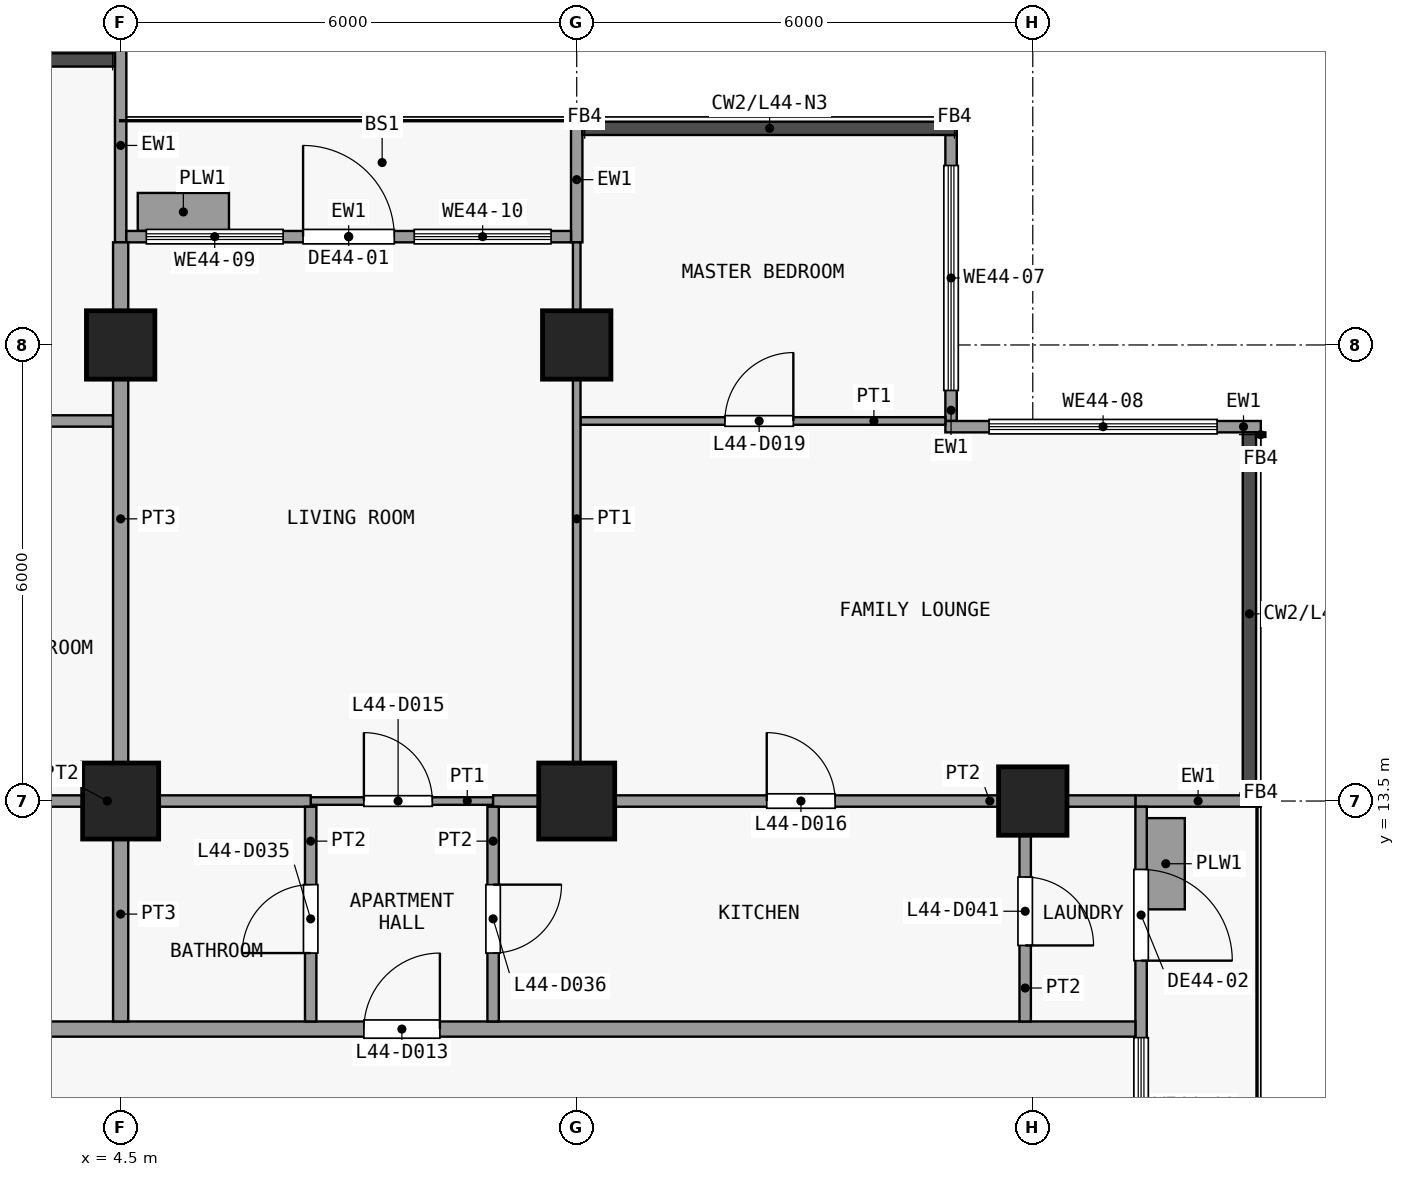
"""IFC4 building model, lengths in metres.
Left out: names, types, materials, properties, quantities, classifications, styles, units other than length and angle.
Written with IfcOpenShell. Run it as: python <this file> out.ifc"""

import sys

from ifc_helpers import new_model, si_unit, direction, frame, frame_2d, origin, origin_2d, place, context, subcontext, project, spatial, rectangle, extrude, element, fill, save


model = new_model("IFC4")
c1 = context("Model", 3, precision=1e-05, world=origin(), true_north=direction((0.0, 1.0)))
c2 = subcontext(c1, "Body", "Model", "MODEL_VIEW")
j1 = project(units=[si_unit("LENGTHUNIT", "METRE"), si_unit("PLANEANGLEUNIT", "RADIAN")], contexts=[c1])
p1 = place(None, origin())
s1 = spatial("IfcSite", under=j1, at=p1, CompositionType="ELEMENT")
p2 = place(p1, origin())
s2 = spatial("IfcBuilding", under=s1, at=p2, CompositionType="ELEMENT")
p3 = place(p2, frame((0.0, 0.0, 178.1)))
s3 = spatial("IfcBuildingStorey", under=s2, at=p3, CompositionType="ELEMENT", Elevation=178.1)
p4 = place(p3, frame((4.5, 13.5, 0.0), z_axis=(0.0, 0.0, 1.0), x_axis=(1.0, 0.0, 0.0)))
e1 = element("IfcColumn", 1, at=p4, inside=s3, PredefinedType="COLUMN", context=c2, shape_type="SweptSolid", body=[
    extrude(rectangle(XDim=1.0, YDim=1.0, at=origin_2d()), origin(), (0.0, 0.0, 1.0), 3.6),
])
p5 = place(p3, frame((4.5, 19.5, 0.0), z_axis=(0.0, 0.0, 1.0), x_axis=(1.0, 0.0, 0.0)))
e2 = element("IfcColumn", 2, at=p5, inside=s3, PredefinedType="COLUMN", context=c2, shape_type="SweptSolid", body=[
    extrude(rectangle(XDim=0.9, YDim=0.9, at=origin_2d()), origin(), (0.0, 0.0, 1.0), 3.6),
])
p6 = place(p3, frame((10.5, 13.5, 0.0), z_axis=(0.0, 0.0, 1.0), x_axis=(1.0, 0.0, 0.0)))
e3 = element("IfcColumn", 3, at=p6, inside=s3, PredefinedType="COLUMN", context=c2, shape_type="SweptSolid", body=[
    extrude(rectangle(XDim=1.0, YDim=1.0, at=origin_2d()), origin(), (0.0, 0.0, 1.0), 3.6),
])
for number, where, z_axis, x_axis in (
    (4, (10.5, 19.5, 0.0), (0.0, 0.0, 1.0), (1.0, 0.0, 0.0)),
    (5, (16.5, 13.5, 0.0), (0.0, 0.0, 1.0), (1.0, 0.0, 0.0)),
):
    element("IfcColumn", number, at=place(p3, frame(where, z_axis=z_axis, x_axis=x_axis)), inside=s3, PredefinedType="COLUMN", context=c2, shape_type="SweptSolid", body=[
        extrude(rectangle(XDim=0.9, YDim=0.9, at=origin_2d()), origin(), (0.0, 0.0, 1.0), 3.6),
    ])
p7 = place(p3, frame((15.425, 22.262, 0.0), z_axis=(0.0, 0.0, 1.0), x_axis=(0.0, -1.0, 0.0)))
e6 = element("IfcWall", 6, at=p7, inside=s3, PredefinedType="SOLIDWALL", context=c2, shape_type="SweptSolid", body=[
    extrude(rectangle(XDim=3.762, YDim=0.15, at=frame_2d((1.881, 0.0))), origin(), (0.0, 0.0, 1.0), 3.3),
])
p8 = place(p7, frame((0.401, 0.0, 0.9)))
e7 = element("IfcOpeningElement", 7, at=p8, cuts=e6, PredefinedType="OPENING", context=c2, shape_type="SweptSolid", body=[
    extrude(rectangle(XDim=2.96, YDim=2.4, at=frame_2d((1.48, 1.2))), frame((0.0, 0.085, 0.0), z_axis=(0.0, -1.0, 0.0), x_axis=(1.0, 0.0, 0.0)), (0.0, 0.0, 1.0), 0.17),
])
p9 = place(p3, frame((15.35, 18.425, 0.0), z_axis=(0.0, 0.0, 1.0), x_axis=(1.0, 0.0, 0.0)))
e8 = element("IfcWall", 8, at=p9, inside=s3, PredefinedType="SOLIDWALL", context=c2, shape_type="SweptSolid", body=[
    extrude(rectangle(XDim=4.15, YDim=0.15, at=frame_2d((2.075, 0.0))), origin(), (0.0, 0.0, 1.0), 3.3),
])
p10 = place(p9, frame((0.575, 0.0, 0.9)))
e9 = element("IfcOpeningElement", 9, at=p10, cuts=e8, PredefinedType="OPENING", context=c2, shape_type="SweptSolid", body=[
    extrude(rectangle(XDim=3.0, YDim=2.4, at=frame_2d((1.5, 1.2))), frame((0.0, 0.085, 0.0), z_axis=(0.0, -1.0, 0.0), x_axis=(1.0, 0.0, 0.0)), (0.0, 0.0, 1.0), 0.17),
])
p11 = place(p3, frame((4.5, 20.85, 0.0), z_axis=(0.0, 0.0, 1.0), x_axis=(0.0, 1.0, 0.0)))
e10 = element("IfcWall", 10, at=p11, inside=s3, PredefinedType="SOLIDWALL", context=c2, shape_type="SweptSolid", body=[
    extrude(rectangle(XDim=2.55, YDim=0.15, at=frame_2d((1.275, 0.0))), origin(), (0.0, 0.0, 1.0), 3.3),
])
p12 = place(p3, frame((10.5, 20.85, 0.0), z_axis=(0.0, 0.0, 1.0), x_axis=(0.0, 1.0, 0.0)))
e11 = element("IfcWall", 11, at=p12, inside=s3, PredefinedType="SOLIDWALL", context=c2, shape_type="SweptSolid", body=[
    extrude(rectangle(XDim=1.65, YDim=0.15, at=frame_2d((0.825, 0.0))), origin(), (0.0, 0.0, 1.0), 3.3),
])
p13 = place(p3, frame((4.575, 20.925, 0.0), z_axis=(0.0, 0.0, 1.0), x_axis=(1.0, 0.0, 0.0)))
e12 = element("IfcWall", 12, at=p13, inside=s3, PredefinedType="SOLIDWALL", context=c2, shape_type="SweptSolid", body=[
    extrude(rectangle(XDim=5.85, YDim=0.15, at=frame_2d((2.925, 0.0))), origin(), (0.0, 0.0, 1.0), 3.3),
])
p14 = place(p13, frame((2.325, 0.0, 0.0)))
e13 = element("IfcOpeningElement", 13, at=p14, cuts=e12, PredefinedType="OPENING", context=c2, shape_type="SweptSolid", body=[
    extrude(rectangle(XDim=1.2, YDim=2.4, at=frame_2d((0.6, 1.2))), frame((0.0, 0.085, 0.0), z_axis=(0.0, -1.0, 0.0), x_axis=(1.0, 0.0, 0.0)), (0.0, 0.0, 1.0), 0.17),
])
p15 = place(p13, frame((0.262, 0.0, 0.9)))
e14 = element("IfcOpeningElement", 14, at=p15, cuts=e12, PredefinedType="OPENING", context=c2, shape_type="SweptSolid", body=[
    extrude(rectangle(XDim=1.8, YDim=2.1, at=frame_2d((0.9, 1.05))), frame((0.0, 0.085, 0.0), z_axis=(0.0, -1.0, 0.0), x_axis=(1.0, 0.0, 0.0)), (0.0, 0.0, 1.0), 0.17),
])
p16 = place(p13, frame((3.788, 0.0, 0.9)))
e15 = element("IfcOpeningElement", 15, at=p16, cuts=e12, PredefinedType="OPENING", context=c2, shape_type="SweptSolid", body=[
    extrude(rectangle(XDim=1.8, YDim=2.1, at=frame_2d((0.9, 1.05))), frame((0.0, 0.085, 0.0), z_axis=(0.0, -1.0, 0.0), x_axis=(1.0, 0.0, 0.0)), (0.0, 0.0, 1.0), 0.17),
])
p17 = place(p3, frame((4.725, 21.25, 0.0), z_axis=(0.0, 0.0, 1.0), x_axis=(1.0, 0.0, 0.0)))
e16 = element("IfcWall", 16, at=p17, inside=s3, PredefinedType="USERDEFINED", context=c2, shape_type="SweptSolid", body=[
    extrude(rectangle(XDim=1.2, YDim=0.5, at=frame_2d((0.6, 0.0))), origin(), (0.0, 0.0, 1.0), 0.9),
])
p18 = place(p3, frame((17.85, 13.5, 0.0), z_axis=(0.0, 0.0, 1.0), x_axis=(1.0, 0.0, 0.0)))
e17 = element("IfcWall", 17, at=p18, inside=s3, PredefinedType="SOLIDWALL", context=c2, shape_type="SweptSolid", body=[
    extrude(rectangle(XDim=1.65, YDim=0.15, at=frame_2d((0.825, 0.0))), origin(), (0.0, 0.0, 1.0), 3.3),
])
p19 = place(p3, frame((17.925, 13.425, 0.0), z_axis=(0.0, 0.0, 1.0), x_axis=(0.0, -1.0, 0.0)))
e18 = element("IfcWall", 18, at=p19, inside=s3, PredefinedType="SOLIDWALL", context=c2, shape_type="SweptSolid", body=[
    extrude(rectangle(XDim=5.85, YDim=0.15, at=frame_2d((2.925, 0.0))), origin(), (0.0, 0.0, 1.0), 3.3),
])
p20 = place(p19, frame((0.825, 0.0, 0.0)))
e19 = element("IfcOpeningElement", 19, at=p20, cuts=e18, PredefinedType="OPENING", context=c2, shape_type="SweptSolid", body=[
    extrude(rectangle(XDim=1.2, YDim=2.4, at=frame_2d((0.6, 1.2))), frame((0.0, 0.085, 0.0), z_axis=(0.0, -1.0, 0.0), x_axis=(1.0, 0.0, 0.0)), (0.0, 0.0, 1.0), 0.17),
])
p21 = place(p19, frame((3.038, 0.0, 0.9)))
e20 = element("IfcOpeningElement", 20, at=p21, cuts=e18, PredefinedType="OPENING", context=c2, shape_type="SweptSolid", body=[
    extrude(rectangle(XDim=1.8, YDim=2.1, at=frame_2d((0.9, 1.05))), frame((0.0, 0.085, 0.0), z_axis=(0.0, -1.0, 0.0), x_axis=(1.0, 0.0, 0.0)), (0.0, 0.0, 1.0), 0.17),
])
p22 = place(p3, frame((18.25, 12.075, 0.0), z_axis=(0.0, 0.0, 1.0), x_axis=(0.0, 1.0, 0.0)))
e21 = element("IfcWall", 21, at=p22, inside=s3, PredefinedType="USERDEFINED", context=c2, shape_type="SweptSolid", body=[
    extrude(rectangle(XDim=1.2, YDim=0.5, at=frame_2d((0.6, 0.0))), origin(), (0.0, 0.0, 1.0), 0.9),
])
p23 = place(p3, frame((-19.35, 10.5, 0.0), z_axis=(0.0, 0.0, 1.0), x_axis=(1.0, 0.0, 0.0)))
e22 = element("IfcWall", 22, at=p23, inside=s3, PredefinedType="PARTITIONING", context=c2, shape_type="SweptSolid", body=[
    extrude(rectangle(XDim=37.2, YDim=0.2, at=frame_2d((18.6, 0.0))), origin(), (0.0, 0.0, 1.0), 3.3),
])
p24 = place(p23, frame((13.05, 0.0, 0.0)))
e23 = element("IfcOpeningElement", 23, at=p24, cuts=e22, PredefinedType="OPENING", context=c2, shape_type="SweptSolid", body=[
    extrude(rectangle(XDim=1.0, YDim=2.1, at=frame_2d((0.5, 1.05))), frame((0.0, 0.11, 0.0), z_axis=(0.0, -1.0, 0.0), x_axis=(1.0, 0.0, 0.0)), (0.0, 0.0, 1.0), 0.22),
])
p25 = place(p23, frame((27.05, 0.0, 0.0)))
e24 = element("IfcOpeningElement", 24, at=p25, cuts=e22, PredefinedType="OPENING", context=c2, shape_type="SweptSolid", body=[
    extrude(rectangle(XDim=1.0, YDim=2.1, at=frame_2d((0.5, 1.05))), frame((0.0, 0.11, 0.0), z_axis=(0.0, -1.0, 0.0), x_axis=(1.0, 0.0, 0.0)), (0.0, 0.0, 1.0), 0.22),
])
p26 = place(p3, frame((7.0, 13.5, 0.0), z_axis=(0.0, 0.0, 1.0), x_axis=(1.0, 0.0, 0.0)))
e25 = element("IfcWall", 25, at=p26, inside=s3, PredefinedType="PARTITIONING", context=c2, shape_type="SweptSolid", body=[
    extrude(rectangle(XDim=2.4, YDim=0.1, at=frame_2d((1.2, 0.0))), origin(), (0.0, 0.0, 1.0), 3.3),
])
p27 = place(p26, frame((0.7, 0.0, 0.0)))
e26 = element("IfcOpeningElement", 26, at=p27, cuts=e25, PredefinedType="OPENING", context=c2, shape_type="SweptSolid", body=[
    extrude(rectangle(XDim=0.9, YDim=2.1, at=frame_2d((0.45, 1.05))), frame((0.0, 0.06, 0.0), z_axis=(0.0, -1.0, 0.0), x_axis=(1.0, 0.0, 0.0)), (0.0, 0.0, 1.0), 0.12),
])
p28 = place(p3, frame((1.65, 13.5, 0.0), z_axis=(0.0, 0.0, 1.0), x_axis=(1.0, 0.0, 0.0)))
e27 = element("IfcWall", 27, at=p28, inside=s3, PredefinedType="PARTITIONING", context=c2, shape_type="SweptSolid", body=[
    extrude(rectangle(XDim=5.35, YDim=0.15, at=frame_2d((2.675, 0.0))), origin(), (0.0, 0.0, 1.0), 3.3),
])
p29 = place(p3, frame((9.4, 13.5, 0.0), z_axis=(0.0, 0.0, 1.0), x_axis=(1.0, 0.0, 0.0)))
e28 = element("IfcWall", 28, at=p29, inside=s3, PredefinedType="PARTITIONING", context=c2, shape_type="SweptSolid", body=[
    extrude(rectangle(XDim=8.45, YDim=0.15, at=frame_2d((4.225, 0.0))), origin(), (0.0, 0.0, 1.0), 3.3),
])
p30 = place(p29, frame((3.6, 0.0, 0.0)))
e29 = element("IfcOpeningElement", 29, at=p30, cuts=e28, PredefinedType="OPENING", context=c2, shape_type="SweptSolid", body=[
    extrude(rectangle(XDim=0.9, YDim=2.1, at=frame_2d((0.45, 1.05))), frame((0.0, 0.085, 0.0), z_axis=(0.0, -1.0, 0.0), x_axis=(1.0, 0.0, 0.0)), (0.0, 0.0, 1.0), 0.17),
])
p31 = place(p3, frame((10.55, 18.5, 0.0), z_axis=(0.0, 0.0, 1.0), x_axis=(1.0, 0.0, 0.0)))
e30 = element("IfcWall", 30, at=p31, inside=s3, PredefinedType="PARTITIONING", context=c2, shape_type="SweptSolid", body=[
    extrude(rectangle(XDim=4.8, YDim=0.1, at=frame_2d((2.4, 0.0))), origin(), (0.0, 0.0, 1.0), 3.3),
])
p32 = place(p31, frame((1.9, 0.0, 0.0)))
e31 = element("IfcOpeningElement", 31, at=p32, cuts=e30, PredefinedType="OPENING", context=c2, shape_type="SweptSolid", body=[
    extrude(rectangle(XDim=0.9, YDim=2.1, at=frame_2d((0.45, 1.05))), frame((0.0, 0.06, 0.0), z_axis=(0.0, -1.0, 0.0), x_axis=(1.0, 0.0, 0.0)), (0.0, 0.0, 1.0), 0.12),
])
p33 = place(p3, frame((1.2, 18.5, 0.0), z_axis=(0.0, 0.0, 1.0), x_axis=(1.0, 0.0, 0.0)))
e32 = element("IfcWall", 32, at=p33, inside=s3, PredefinedType="PARTITIONING", context=c2, shape_type="SweptSolid", body=[
    extrude(rectangle(XDim=3.2, YDim=0.15, at=frame_2d((1.6, 0.0))), origin(), (0.0, 0.0, 1.0), 3.3),
])
p34 = place(p33, frame((1.2, 0.0, 0.0)))
e33 = element("IfcOpeningElement", 33, at=p34, cuts=e32, PredefinedType="OPENING", context=c2, shape_type="SweptSolid", body=[
    extrude(rectangle(XDim=0.9, YDim=2.1, at=frame_2d((0.45, 1.05))), frame((0.0, 0.085, 0.0), z_axis=(0.0, -1.0, 0.0), x_axis=(1.0, 0.0, 0.0)), (0.0, 0.0, 1.0), 0.17),
])
p35 = place(p3, frame((4.5, 10.6, 0.0), z_axis=(0.0, 0.0, 1.0), x_axis=(0.0, 1.0, 0.0)))
e34 = element("IfcWall", 34, at=p35, inside=s3, PredefinedType="PARTITIONING", context=c2, shape_type="SweptSolid", body=[
    extrude(rectangle(XDim=2.825, YDim=0.2, at=frame_2d((1.413, 0.0))), origin(), (0.0, 0.0, 1.0), 3.3),
])
p36 = place(p3, frame((4.5, 13.575, 0.0), z_axis=(0.0, 0.0, 1.0), x_axis=(0.0, 1.0, 0.0)))
e35 = element("IfcWall", 35, at=p36, inside=s3, PredefinedType="PARTITIONING", context=c2, shape_type="SweptSolid", body=[
    extrude(rectangle(XDim=7.275, YDim=0.2, at=frame_2d((3.638, 0.0))), origin(), (0.0, 0.0, 1.0), 3.3),
])
p37 = place(p3, frame((7.0, 10.6, 0.0), z_axis=(0.0, 0.0, 1.0), x_axis=(0.0, 1.0, 0.0)))
e36 = element("IfcWall", 36, at=p37, inside=s3, PredefinedType="PARTITIONING", context=c2, shape_type="SweptSolid", body=[
    extrude(rectangle(XDim=2.825, YDim=0.15, at=frame_2d((1.413, 0.0))), origin(), (0.0, 0.0, 1.0), 3.3),
])
p38 = place(p37, frame((0.9, 0.0, 0.0)))
e37 = element("IfcOpeningElement", 37, at=p38, cuts=e36, PredefinedType="OPENING", context=c2, shape_type="SweptSolid", body=[
    extrude(rectangle(XDim=0.9, YDim=2.1, at=frame_2d((0.45, 1.05))), frame((0.0, 0.085, 0.0), z_axis=(0.0, -1.0, 0.0), x_axis=(1.0, 0.0, 0.0)), (0.0, 0.0, 1.0), 0.17),
])
p39 = place(p3, frame((9.4, 10.6, 0.0), z_axis=(0.0, 0.0, 1.0), x_axis=(0.0, 1.0, 0.0)))
e38 = element("IfcWall", 38, at=p39, inside=s3, PredefinedType="PARTITIONING", context=c2, shape_type="SweptSolid", body=[
    extrude(rectangle(XDim=2.825, YDim=0.15, at=frame_2d((1.413, 0.0))), origin(), (0.0, 0.0, 1.0), 3.3),
])
p40 = place(p39, frame((0.9, 0.0, 0.0)))
e39 = element("IfcOpeningElement", 39, at=p40, cuts=e38, PredefinedType="OPENING", context=c2, shape_type="SweptSolid", body=[
    extrude(rectangle(XDim=0.9, YDim=2.1, at=frame_2d((0.45, 1.05))), frame((0.0, 0.085, 0.0), z_axis=(0.0, -1.0, 0.0), x_axis=(1.0, 0.0, 0.0)), (0.0, 0.0, 1.0), 0.17),
])
p41 = place(p3, frame((10.5, 13.575, 0.0), z_axis=(0.0, 0.0, 1.0), x_axis=(0.0, 1.0, 0.0)))
e40 = element("IfcWall", 40, at=p41, inside=s3, PredefinedType="PARTITIONING", context=c2, shape_type="SweptSolid", body=[
    extrude(rectangle(XDim=7.275, YDim=0.1, at=frame_2d((3.638, 0.0))), origin(), (0.0, 0.0, 1.0), 3.3),
])
p42 = place(p3, frame((16.4, 10.6, 0.0), z_axis=(0.0, 0.0, 1.0), x_axis=(0.0, 1.0, 0.0)))
e41 = element("IfcWall", 41, at=p42, inside=s3, PredefinedType="PARTITIONING", context=c2, shape_type="SweptSolid", body=[
    extrude(rectangle(XDim=2.825, YDim=0.15, at=frame_2d((1.413, 0.0))), origin(), (0.0, 0.0, 1.0), 3.3),
])
p43 = place(p42, frame((1.0, 0.0, 0.0)))
e42 = element("IfcOpeningElement", 42, at=p43, cuts=e41, PredefinedType="OPENING", context=c2, shape_type="SweptSolid", body=[
    extrude(rectangle(XDim=0.9, YDim=2.1, at=frame_2d((0.45, 1.05))), frame((0.0, 0.085, 0.0), z_axis=(0.0, -1.0, 0.0), x_axis=(1.0, 0.0, 0.0)), (0.0, 0.0, 1.0), 0.17),
])
p44 = place(p8, origin())
e43 = element("IfcWindow", 43, at=p44, inside=s3, PartitioningType="SINGLE_PANEL", PredefinedType="WINDOW", context=c2, shape_type="SweptSolid", body=[
    extrude(rectangle(XDim=2.96, YDim=2.4, at=frame_2d((1.48, 1.2))), frame((0.0, 0.03, 0.0), z_axis=(0.0, -1.0, 0.0), x_axis=(1.0, 0.0, 0.0)), (0.0, 0.0, 1.0), 0.06),
])
fill(e7, e43)
p45 = place(p10, origin())
e44 = element("IfcWindow", 44, at=p45, inside=s3, PartitioningType="SINGLE_PANEL", PredefinedType="WINDOW", context=c2, shape_type="SweptSolid", body=[
    extrude(rectangle(XDim=3.0, YDim=2.4, at=frame_2d((1.5, 1.2))), frame((0.0, 0.03, 0.0), z_axis=(0.0, -1.0, 0.0), x_axis=(1.0, 0.0, 0.0)), (0.0, 0.0, 1.0), 0.06),
])
fill(e9, e44)
p46 = place(p14, origin())
e45 = element("IfcDoor", 45, at=p46, inside=s3, OperationType="SINGLE_SWING_LEFT", PredefinedType="DOOR", context=c2, shape_type="SweptSolid", body=[
    extrude(rectangle(XDim=1.2, YDim=2.4, at=frame_2d((0.6, 1.2))), frame((0.0, 0.025, 0.0), z_axis=(0.0, -1.0, 0.0), x_axis=(1.0, 0.0, 0.0)), (0.0, 0.0, 1.0), 0.05),
])
fill(e13, e45)
p47 = place(p15, origin())
e46 = element("IfcWindow", 46, at=p47, inside=s3, PartitioningType="SINGLE_PANEL", PredefinedType="WINDOW", context=c2, shape_type="SweptSolid", body=[
    extrude(rectangle(XDim=1.8, YDim=2.1, at=frame_2d((0.9, 1.05))), frame((0.0, 0.03, 0.0), z_axis=(0.0, -1.0, 0.0), x_axis=(1.0, 0.0, 0.0)), (0.0, 0.0, 1.0), 0.06),
])
fill(e14, e46)
p48 = place(p16, origin())
e47 = element("IfcWindow", 47, at=p48, inside=s3, PartitioningType="SINGLE_PANEL", PredefinedType="WINDOW", context=c2, shape_type="SweptSolid", body=[
    extrude(rectangle(XDim=1.8, YDim=2.1, at=frame_2d((0.9, 1.05))), frame((0.0, 0.03, 0.0), z_axis=(0.0, -1.0, 0.0), x_axis=(1.0, 0.0, 0.0)), (0.0, 0.0, 1.0), 0.06),
])
fill(e15, e47)
p49 = place(p20, origin())
e48 = element("IfcDoor", 48, at=p49, inside=s3, OperationType="SINGLE_SWING_RIGHT", PredefinedType="DOOR", context=c2, shape_type="SweptSolid", body=[
    extrude(rectangle(XDim=1.2, YDim=2.4, at=frame_2d((0.6, 1.2))), frame((0.0, 0.025, 0.0), z_axis=(0.0, -1.0, 0.0), x_axis=(1.0, 0.0, 0.0)), (0.0, 0.0, 1.0), 0.05),
])
fill(e19, e48)
p50 = place(p21, origin())
e49 = element("IfcWindow", 49, at=p50, inside=s3, PartitioningType="SINGLE_PANEL", PredefinedType="WINDOW", context=c2, shape_type="SweptSolid", body=[
    extrude(rectangle(XDim=1.8, YDim=2.1, at=frame_2d((0.9, 1.05))), frame((0.0, 0.03, 0.0), z_axis=(0.0, -1.0, 0.0), x_axis=(1.0, 0.0, 0.0)), (0.0, 0.0, 1.0), 0.06),
])
fill(e20, e49)
p51 = place(p25, origin())
e50 = element("IfcDoor", 50, at=p51, inside=s3, OperationType="SINGLE_SWING_LEFT", PredefinedType="DOOR", context=c2, shape_type="SweptSolid", body=[
    extrude(rectangle(XDim=1.0, YDim=2.1, at=frame_2d((0.5, 1.05))), frame((0.0, 0.025, 0.0), z_axis=(0.0, -1.0, 0.0), x_axis=(1.0, 0.0, 0.0)), (0.0, 0.0, 1.0), 0.05),
])
fill(e24, e50)
p52 = place(p27, origin())
e51 = element("IfcDoor", 51, at=p52, inside=s3, OperationType="SINGLE_SWING_RIGHT", PredefinedType="DOOR", context=c2, shape_type="SweptSolid", body=[
    extrude(rectangle(XDim=0.9, YDim=2.1, at=frame_2d((0.45, 1.05))), frame((0.0, 0.025, 0.0), z_axis=(0.0, -1.0, 0.0), x_axis=(1.0, 0.0, 0.0)), (0.0, 0.0, 1.0), 0.05),
])
fill(e26, e51)
p53 = place(p30, origin())
e52 = element("IfcDoor", 52, at=p53, inside=s3, OperationType="SINGLE_SWING_RIGHT", PredefinedType="DOOR", context=c2, shape_type="SweptSolid", body=[
    extrude(rectangle(XDim=0.9, YDim=2.1, at=frame_2d((0.45, 1.05))), frame((0.0, 0.025, 0.0), z_axis=(0.0, -1.0, 0.0), x_axis=(1.0, 0.0, 0.0)), (0.0, 0.0, 1.0), 0.05),
])
fill(e29, e52)
p54 = place(p32, origin())
e53 = element("IfcDoor", 53, at=p54, inside=s3, OperationType="SINGLE_SWING_LEFT", PredefinedType="DOOR", context=c2, shape_type="SweptSolid", body=[
    extrude(rectangle(XDim=0.9, YDim=2.1, at=frame_2d((0.45, 1.05))), frame((0.0, 0.025, 0.0), z_axis=(0.0, -1.0, 0.0), x_axis=(1.0, 0.0, 0.0)), (0.0, 0.0, 1.0), 0.05),
])
fill(e31, e53)
p55 = place(p38, origin())
e54 = element("IfcDoor", 54, at=p55, inside=s3, OperationType="SINGLE_SWING_RIGHT", PredefinedType="DOOR", context=c2, shape_type="SweptSolid", body=[
    extrude(rectangle(XDim=0.9, YDim=2.1, at=frame_2d((0.45, 1.05))), frame((0.0, 0.025, 0.0), z_axis=(0.0, -1.0, 0.0), x_axis=(1.0, 0.0, 0.0)), (0.0, 0.0, 1.0), 0.05),
])
fill(e37, e54)
p56 = place(p40, origin())
e55 = element("IfcDoor", 55, at=p56, inside=s3, OperationType="SINGLE_SWING_RIGHT", PredefinedType="DOOR", context=c2, shape_type="SweptSolid", body=[
    extrude(rectangle(XDim=0.9, YDim=2.1, at=frame_2d((0.45, 1.05))), frame((0.0, 0.025, 0.0), z_axis=(0.0, -1.0, 0.0), x_axis=(1.0, 0.0, 0.0)), (0.0, 0.0, 1.0), 0.05),
])
fill(e39, e55)
p57 = place(p43, origin())
e56 = element("IfcDoor", 56, at=p57, inside=s3, OperationType="SINGLE_SWING_LEFT", PredefinedType="DOOR", context=c2, shape_type="SweptSolid", body=[
    extrude(rectangle(XDim=0.9, YDim=2.1, at=frame_2d((0.45, 1.05))), frame((0.0, 0.025, 0.0), z_axis=(0.0, -1.0, 0.0), x_axis=(1.0, 0.0, 0.0)), (0.0, 0.0, 1.0), 0.05),
])
fill(e42, e56)
save(model, sys.argv[1])
